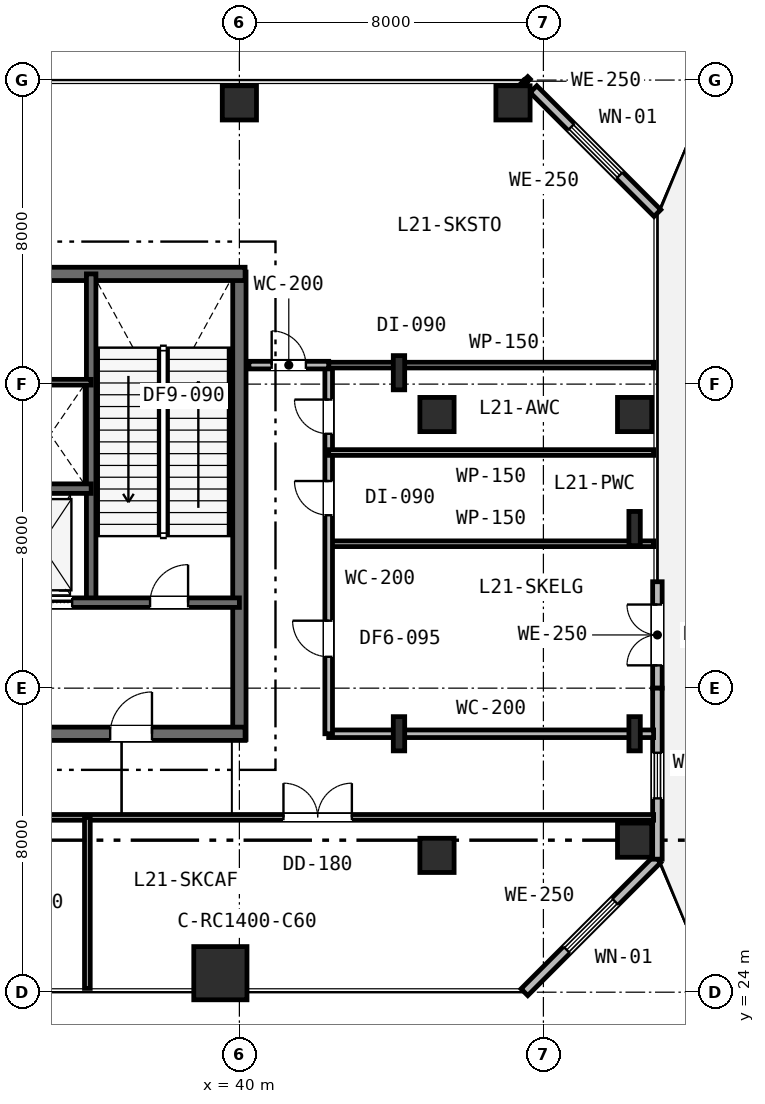
"""IFC4 building model, lengths in metres.
Left out: names, types, materials, properties, quantities, classifications, styles, units other than length and angle.
Written with IfcOpenShell. Run it as: python <this file> out.ifc"""

import sys

from ifc_helpers import new_model, si_unit, direction, frame, frame_2d, origin, origin_2d, place, context, subcontext, project, spatial, rectangle, i_section, extrude, element, fill, save


model = new_model("IFC4")
c1 = context("Model", 3, precision=1e-05, world=origin(), true_north=direction((0.0, 1.0)))
c2 = subcontext(c1, "Body", "Model", "MODEL_VIEW")
j1 = project(units=[si_unit("LENGTHUNIT", "METRE"), si_unit("PLANEANGLEUNIT", "RADIAN")], contexts=[c1])
p1 = place(None, origin())
s1 = spatial("IfcSite", under=j1, at=p1, CompositionType="ELEMENT")
p2 = place(p1, origin())
s2 = spatial("IfcBuilding", under=s1, at=p2, CompositionType="ELEMENT")
p3 = place(p2, frame((0.0, 0.0, 84.6)))
s3 = spatial("IfcBuildingStorey", under=s2, at=p3, CompositionType="ELEMENT", Elevation=84.6)
p4 = place(p3, frame((40.0, 30.65, 0.0), z_axis=(0.0, 0.0, 1.0), x_axis=(0.0, 1.0, 0.0)))
e1 = element("IfcWall", 1, at=p4, inside=s3, PredefinedType="SHEAR", context=c2, shape_type="SweptSolid", body=[
    extrude(rectangle(XDim=12.3, YDim=0.35, at=frame_2d((6.15, 0.0))), origin(), (0.0, 0.0, 1.0), 5.4),
])
p5 = place(p3, frame((15.85, 42.9, 0.0), z_axis=(0.0, 0.0, 1.0), x_axis=(1.0, 0.0, 0.0)))
e2 = element("IfcWall", 2, at=p5, inside=s3, PredefinedType="SHEAR", context=c2, shape_type="SweptSolid", body=[
    extrude(rectangle(XDim=24.3, YDim=0.35, at=frame_2d((12.15, 0.0))), origin(), (0.0, 0.0, 1.0), 5.4),
])
p6 = place(p3, frame((28.95, 30.8, 0.0), z_axis=(0.0, 0.0, 1.0), x_axis=(1.0, 0.0, 0.0)))
e3 = element("IfcWall", 3, at=p6, inside=s3, PredefinedType="SHEAR", context=c2, shape_type="SweptSolid", body=[
    extrude(rectangle(XDim=11.2, YDim=0.35, at=frame_2d((5.6, 0.0))), origin(), (0.0, 0.0, 1.0), 5.4),
])
p7 = place(p6, frame((7.65, 0.0, 0.0)))
e4 = element("IfcOpeningElement", 4, at=p7, cuts=e3, PredefinedType="OPENING", context=c2, shape_type="SweptSolid", body=[
    extrude(rectangle(XDim=1.1, YDim=2.15, at=frame_2d((0.55, 1.075))), frame((0.0, 0.185, 0.0), z_axis=(0.0, -1.0, 0.0), x_axis=(1.0, 0.0, 0.0)), (0.0, 0.0, 1.0), 0.37),
])
p8 = place(p3, frame((36.1, 34.25, 0.0), z_axis=(0.0, 0.0, 1.0), x_axis=(0.0, 1.0, 0.0)))
e5 = element("IfcWall", 5, at=p8, inside=s3, PredefinedType="SHEAR", context=c2, shape_type="SweptSolid", body=[
    extrude(rectangle(XDim=8.65, YDim=0.25, at=frame_2d((4.325, 0.0))), origin(), (0.0, 0.0, 1.0), 5.4),
])
p9 = place(p3, frame((33.95, 34.25, 0.0), z_axis=(0.0, 0.0, 1.0), x_axis=(1.0, 0.0, 0.0)))
e6 = element("IfcWall", 6, at=p9, inside=s3, PredefinedType="SHEAR", context=c2, shape_type="SweptSolid", body=[
    extrude(rectangle(XDim=6.05, YDim=0.25, at=frame_2d((3.025, 0.0))), origin(), (0.0, 0.0, 1.0), 5.4),
])
p10 = place(p9, frame((3.7, 0.0, 0.0)))
e7 = element("IfcOpeningElement", 7, at=p10, cuts=e6, PredefinedType="OPENING", context=c2, shape_type="SweptSolid", body=[
    extrude(rectangle(XDim=1.0, YDim=2.15, at=frame_2d((0.5, 1.075))), frame((0.0, 0.135, 0.0), z_axis=(0.0, -1.0, 0.0), x_axis=(1.0, 0.0, 0.0)), (0.0, 0.0, 1.0), 0.27),
])
p11 = place(p9, frame((0.55, 0.0, 0.0)))
e8 = element("IfcOpeningElement", 8, at=p11, cuts=e6, PredefinedType="OPENING", context=c2, shape_type="SweptSolid", body=[
    extrude(rectangle(XDim=1.1, YDim=2.15, at=frame_2d((0.55, 1.075))), frame((0.0, 0.135, 0.0), z_axis=(0.0, -1.0, 0.0), x_axis=(1.0, 0.0, 0.0)), (0.0, 0.0, 1.0), 0.27),
])
p12 = place(p3, frame((19.9, 37.25, 0.0), z_axis=(0.0, 0.0, 1.0), x_axis=(1.0, 0.0, 0.0)))
e9 = element("IfcWall", 9, at=p12, inside=s3, PredefinedType="SHEAR", context=c2, shape_type="SweptSolid", body=[
    extrude(rectangle(XDim=16.2, YDim=0.25, at=frame_2d((8.1, 0.0))), origin(), (0.0, 0.0, 1.0), 5.4),
])
p13 = place(p12, frame((12.55, 0.0, 0.0)))
e10 = element("IfcOpeningElement", 10, at=p13, cuts=e9, PredefinedType="OPENING", context=c2, shape_type="SweptSolid", body=[
    extrude(rectangle(XDim=0.9, YDim=2.15, at=frame_2d((0.45, 1.075))), frame((0.0, 0.135, 0.0), z_axis=(0.0, -1.0, 0.0), x_axis=(1.0, 0.0, 0.0)), (0.0, 0.0, 1.0), 0.27),
])
p14 = place(p3, frame((39.5, 24.5, 0.0), z_axis=(0.0, 0.0, 1.0), x_axis=(1.0, 0.0, 0.0)))
e11 = element("IfcColumn", 11, at=p14, inside=s3, PredefinedType="COLUMN", context=c2, shape_type="SweptSolid", body=[
    extrude(rectangle(XDim=1.4, YDim=1.4, at=origin_2d()), origin(), (0.0, 0.0, 1.0), 5.4),
])
for number, where, z_axis, x_axis in (
    (12, (45.2, 27.6, 0.0), (0.0, 0.0, 1.0), (1.0, 0.0, 0.0)),
    (13, (45.2, 39.2, 0.0), (0.0, 0.0, 1.0), (1.0, 0.0, 0.0)),
    (14, (40.0, 47.4, 0.0), (0.0, 0.0, 1.0), (1.0, 0.0, 0.0)),
    (15, (47.2, 47.4, 0.0), (0.0, 0.0, 1.0), (1.0, 0.0, 0.0)),
    (16, (50.4, 28.0, 0.0), (0.0, 0.0, 1.0), (1.0, 0.0, 0.0)),
    (17, (50.4, 39.2, 0.0), (0.0, 0.0, 1.0), (1.0, 0.0, 0.0)),
):
    element("IfcColumn", number, at=place(p3, frame(where, z_axis=z_axis, x_axis=x_axis)), inside=s3, PredefinedType="COLUMN", context=c2, shape_type="SweptSolid", body=[
        extrude(rectangle(XDim=0.9, YDim=0.9, at=origin_2d()), origin(), (0.0, 0.0, 1.0), 5.4),
    ])
for number, where, z_axis, x_axis in (
    (18, (44.2, 30.8, 0.0), (0.0, 0.0, 1.0), (1.0, 0.0, 0.0)),
    (19, (44.2, 40.3, 0.0), (0.0, 0.0, 1.0), (1.0, 0.0, 0.0)),
    (20, (50.4, 30.8, 0.0), (0.0, 0.0, 1.0), (1.0, 0.0, 0.0)),
    (21, (50.4, 36.2, 0.0), (0.0, 0.0, 1.0), (1.0, 0.0, 0.0)),
):
    element("IfcColumn", number, at=place(p3, frame(where, z_axis=z_axis, x_axis=x_axis)), inside=s3, PredefinedType="COLUMN", context=c2, shape_type="SweptSolid", body=[
        extrude(i_section(OverallWidth=0.3, OverallDepth=0.9, WebThickness=0.018, FlangeThickness=0.035, FilletRadius=0.03, at=origin_2d()), origin(), (0.0, 0.0, 1.0), 5.4),
    ])
p15 = place(p3, frame((47.5, 24.0, 0.0), z_axis=(0.0, 0.0, 1.0), x_axis=(0.707106781187, 0.707106781187, 0.0)))
e22 = element("IfcWall", 22, at=p15, inside=s3, PredefinedType="STANDARD", context=c2, shape_type="SweptSolid", body=[
    extrude(rectangle(XDim=4.95, YDim=0.25, at=frame_2d((2.475, 0.0))), origin(), (0.0, 0.0, 1.0), 5.13),
])
p16 = place(p15, frame((1.575, 0.0, 0.75)))
e23 = element("IfcOpeningElement", 23, at=p16, cuts=e22, PredefinedType="OPENING", context=c2, shape_type="SweptSolid", body=[
    extrude(rectangle(XDim=1.8, YDim=1.85, at=frame_2d((0.9, 0.925))), frame((0.0, 0.135, 0.0), z_axis=(0.0, -1.0, 0.0), x_axis=(1.0, 0.0, 0.0)), (0.0, 0.0, 1.0), 0.27),
])
p17 = place(p3, frame((51.0, 32.0, 0.0), z_axis=(0.0, 0.0, 1.0), x_axis=(0.0, 1.0, 0.0)))
e24 = element("IfcWall", 24, at=p17, inside=s3, PredefinedType="STANDARD", context=c2, shape_type="SweptSolid", body=[
    extrude(rectangle(XDim=2.8, YDim=0.25, at=frame_2d((1.4, 0.0))), origin(), (0.0, 0.0, 1.0), 5.13),
])
p18 = place(p17, frame((0.6, 0.0, 0.0)))
e25 = element("IfcOpeningElement", 25, at=p18, cuts=e24, PredefinedType="OPENING", context=c2, shape_type="SweptSolid", body=[
    extrude(rectangle(XDim=1.6, YDim=2.2, at=frame_2d((0.8, 1.1))), frame((0.0, 0.135, 0.0), z_axis=(0.0, -1.0, 0.0), x_axis=(1.0, 0.0, 0.0)), (0.0, 0.0, 1.0), 0.27),
])
p19 = place(p3, frame((51.0, 27.5, 0.0), z_axis=(0.0, 0.0, 1.0), x_axis=(0.0, 1.0, 0.0)))
e26 = element("IfcWall", 26, at=p19, inside=s3, PredefinedType="STANDARD", context=c2, shape_type="SweptSolid", body=[
    extrude(rectangle(XDim=4.5, YDim=0.25, at=frame_2d((2.25, 0.0))), origin(), (0.0, 0.0, 1.0), 5.13),
])
p20 = place(p19, frame((1.6, 0.0, 0.85)))
e27 = element("IfcOpeningElement", 27, at=p20, cuts=e26, PredefinedType="OPENING", context=c2, shape_type="SweptSolid", body=[
    extrude(rectangle(XDim=1.2, YDim=1.6, at=frame_2d((0.6, 0.8))), frame((0.0, 0.135, 0.0), z_axis=(0.0, -1.0, 0.0), x_axis=(1.0, 0.0, 0.0)), (0.0, 0.0, 1.0), 0.27),
])
p21 = place(p3, frame((51.0, 44.5, 0.0), z_axis=(0.0, 0.0, 1.0), x_axis=(-0.707106781187, 0.707106781187, 0.0)))
e28 = element("IfcWall", 28, at=p21, inside=s3, PredefinedType="STANDARD", context=c2, shape_type="SweptSolid", body=[
    extrude(rectangle(XDim=4.613, YDim=0.25, at=frame_2d((2.306, 0.0))), origin(), (0.0, 0.0, 1.0), 5.13),
])
p22 = place(p21, frame((1.406, 0.0, 0.75)))
e29 = element("IfcOpeningElement", 29, at=p22, cuts=e28, PredefinedType="OPENING", context=c2, shape_type="SweptSolid", body=[
    extrude(rectangle(XDim=1.8, YDim=1.85, at=frame_2d((0.9, 0.925))), frame((0.0, 0.135, 0.0), z_axis=(0.0, -1.0, 0.0), x_axis=(1.0, 0.0, 0.0)), (0.0, 0.0, 1.0), 0.27),
])
p23 = place(p3, frame((47.562, 47.938, 0.0), z_axis=(0.0, 0.0, 1.0), x_axis=(-0.707106781187, 0.707106781187, 0.0)))
e30 = element("IfcWall", 30, at=p23, inside=s3, PredefinedType="STANDARD", context=c2, shape_type="SweptSolid", body=[
    extrude(rectangle(XDim=0.087, YDim=0.25, at=frame_2d((0.044, 0.0))), origin(), (0.0, 0.0, 1.0), 5.13),
])
p24 = place(p3, frame((34.05, 40.05, 0.0), z_axis=(0.0, 0.0, 1.0), x_axis=(1.0, 0.0, 0.0)))
e31 = element("IfcWall", 31, at=p24, inside=s3, PredefinedType="PARTITIONING", context=c2, shape_type="SweptSolid", body=[
    extrude(rectangle(XDim=2.05, YDim=0.15, at=frame_2d((1.025, 0.0))), origin(), (0.0, 0.0, 1.0), 5.13),
])
p25 = place(p3, frame((42.35, 30.8, 0.0), z_axis=(0.0, 0.0, 1.0), x_axis=(1.0, 0.0, 0.0)))
e32 = element("IfcWall", 32, at=p25, inside=s3, PredefinedType="PARTITIONING", context=c2, shape_type="SweptSolid", body=[
    extrude(rectangle(XDim=8.55, YDim=0.2, at=frame_2d((4.275, 0.0))), origin(), (0.0, 0.0, 1.0), 4.63),
])
p26 = place(p3, frame((42.35, 35.8, 0.0), z_axis=(0.0, 0.0, 1.0), x_axis=(1.0, 0.0, 0.0)))
e33 = element("IfcWall", 33, at=p26, inside=s3, PredefinedType="PARTITIONING", context=c2, shape_type="SweptSolid", body=[
    extrude(rectangle(XDim=8.55, YDim=0.15, at=frame_2d((4.275, 0.0))), origin(), (0.0, 0.0, 1.0), 4.63),
])
p27 = place(p3, frame((42.35, 30.8, 0.0), z_axis=(0.0, 0.0, 1.0), x_axis=(0.0, 1.0, 0.0)))
e34 = element("IfcWall", 34, at=p27, inside=s3, PredefinedType="PARTITIONING", context=c2, shape_type="SweptSolid", body=[
    extrude(rectangle(XDim=9.7, YDim=0.2, at=frame_2d((4.85, 0.0))), origin(), (0.0, 0.0, 1.0), 4.63),
])
p28 = place(p27, frame((2.025, 0.0, 0.0)))
e35 = element("IfcOpeningElement", 35, at=p28, cuts=e34, PredefinedType="OPENING", context=c2, shape_type="SweptSolid", body=[
    extrude(rectangle(XDim=0.95, YDim=2.15, at=frame_2d((0.475, 1.075))), frame((0.0, 0.11, 0.0), z_axis=(0.0, -1.0, 0.0), x_axis=(1.0, 0.0, 0.0)), (0.0, 0.0, 1.0), 0.22),
])
p29 = place(p27, frame((5.75, 0.0, 0.0)))
e36 = element("IfcOpeningElement", 36, at=p29, cuts=e34, PredefinedType="OPENING", context=c2, shape_type="SweptSolid", body=[
    extrude(rectangle(XDim=0.9, YDim=2.15, at=frame_2d((0.45, 1.075))), frame((0.0, 0.11, 0.0), z_axis=(0.0, -1.0, 0.0), x_axis=(1.0, 0.0, 0.0)), (0.0, 0.0, 1.0), 0.22),
])
p30 = place(p27, frame((7.893, 0.0, 0.0)))
e37 = element("IfcOpeningElement", 37, at=p30, cuts=e34, PredefinedType="OPENING", context=c2, shape_type="SweptSolid", body=[
    extrude(rectangle(XDim=0.9, YDim=2.15, at=frame_2d((0.45, 1.075))), frame((0.0, 0.11, 0.0), z_axis=(0.0, -1.0, 0.0), x_axis=(1.0, 0.0, 0.0)), (0.0, 0.0, 1.0), 0.22),
])
for number, where, z_axis, x_axis in (
    (38, (42.35, 38.2, 0.0), (0.0, 0.0, 1.0), (1.0, 0.0, 0.0)),
    (39, (42.35, 40.5, 0.0), (0.0, 0.0, 1.0), (1.0, 0.0, 0.0)),
):
    element("IfcWall", number, at=place(p3, frame(where, z_axis=z_axis, x_axis=x_axis)), inside=s3, PredefinedType="PARTITIONING", context=c2, shape_type="SweptSolid", body=[
        extrude(rectangle(XDim=8.55, YDim=0.15, at=frame_2d((4.275, 0.0))), origin(), (0.0, 0.0, 1.0), 4.63),
    ])
p31 = place(p3, frame((40.25, 40.5, 0.0), z_axis=(0.0, 0.0, 1.0), x_axis=(1.0, 0.0, 0.0)))
e40 = element("IfcWall", 40, at=p31, inside=s3, PredefinedType="PARTITIONING", context=c2, shape_type="SweptSolid", body=[
    extrude(rectangle(XDim=2.1, YDim=0.2, at=frame_2d((1.05, 0.0))), origin(), (0.0, 0.0, 1.0), 5.13),
])
p32 = place(p31, frame((0.6, 0.0, 0.0)))
e41 = element("IfcOpeningElement", 41, at=p32, cuts=e40, PredefinedType="OPENING", context=c2, shape_type="SweptSolid", body=[
    extrude(rectangle(XDim=0.9, YDim=2.15, at=frame_2d((0.45, 1.075))), frame((0.0, 0.11, 0.0), z_axis=(0.0, -1.0, 0.0), x_axis=(1.0, 0.0, 0.0)), (0.0, 0.0, 1.0), 0.22),
])
p33 = place(p3, frame((13.7, 28.6, 0.0), z_axis=(0.0, 0.0, 1.0), x_axis=(1.0, 0.0, 0.0)))
e42 = element("IfcWall", 42, at=p33, inside=s3, PredefinedType="PARTITIONING", context=c2, shape_type="SweptSolid", body=[
    extrude(rectangle(XDim=37.2, YDim=0.15, at=frame_2d((18.6, 0.0))), origin(), (0.0, 0.0, 1.0), 4.63),
])
p34 = place(p33, frame((15.4, 0.0, 0.0)))
e43 = element("IfcOpeningElement", 43, at=p34, cuts=e42, PredefinedType="OPENING", context=c2, shape_type="SweptSolid", body=[
    extrude(rectangle(XDim=1.8, YDim=2.15, at=frame_2d((0.9, 1.075))), frame((0.0, 0.085, 0.0), z_axis=(0.0, -1.0, 0.0), x_axis=(1.0, 0.0, 0.0)), (0.0, 0.0, 1.0), 0.17),
])
p35 = place(p33, frame((27.46, 0.0, 0.0)))
e44 = element("IfcOpeningElement", 44, at=p35, cuts=e42, PredefinedType="OPENING", context=c2, shape_type="SweptSolid", body=[
    extrude(rectangle(XDim=1.8, YDim=2.15, at=frame_2d((0.9, 1.075))), frame((0.0, 0.085, 0.0), z_axis=(0.0, -1.0, 0.0), x_axis=(1.0, 0.0, 0.0)), (0.0, 0.0, 1.0), 0.17),
])
p36 = place(p3, frame((36.0, 24.1, 0.0), z_axis=(0.0, 0.0, 1.0), x_axis=(0.0, 1.0, 0.0)))
e45 = element("IfcWall", 45, at=p36, inside=s3, PredefinedType="PARTITIONING", context=c2, shape_type="SweptSolid", body=[
    extrude(rectangle(XDim=4.5, YDim=0.15, at=frame_2d((2.25, 0.0))), origin(), (0.0, 0.0, 1.0), 4.72),
])
p37 = place(p16, origin())
e46 = element("IfcWindow", 46, at=p37, inside=s3, PartitioningType="SINGLE_PANEL", PredefinedType="WINDOW", context=c2, shape_type="SweptSolid", body=[
    extrude(rectangle(XDim=1.8, YDim=1.85, at=frame_2d((0.9, 0.925))), frame((0.0, 0.03, 0.0), z_axis=(0.0, -1.0, 0.0), x_axis=(1.0, 0.0, 0.0)), (0.0, 0.0, 1.0), 0.06),
])
fill(e23, e46)
p38 = place(p18, origin())
e47 = element("IfcDoor", 47, at=p38, inside=s3, OperationType="DOUBLE_DOOR_SINGLE_SWING", PredefinedType="DOOR", context=c2, shape_type="SweptSolid", body=[
    extrude(rectangle(XDim=1.6, YDim=2.2, at=frame_2d((0.8, 1.1))), frame((0.0, 0.025, 0.0), z_axis=(0.0, -1.0, 0.0), x_axis=(1.0, 0.0, 0.0)), (0.0, 0.0, 1.0), 0.05),
])
fill(e25, e47)
p39 = place(p20, origin())
e48 = element("IfcWindow", 48, at=p39, inside=s3, PartitioningType="SINGLE_PANEL", PredefinedType="WINDOW", context=c2, shape_type="SweptSolid", body=[
    extrude(rectangle(XDim=1.2, YDim=1.6, at=frame_2d((0.6, 0.8))), frame((0.0, 0.03, 0.0), z_axis=(0.0, -1.0, 0.0), x_axis=(1.0, 0.0, 0.0)), (0.0, 0.0, 1.0), 0.06),
])
fill(e27, e48)
p40 = place(p22, origin())
e49 = element("IfcWindow", 49, at=p40, inside=s3, PartitioningType="SINGLE_PANEL", PredefinedType="WINDOW", context=c2, shape_type="SweptSolid", body=[
    extrude(rectangle(XDim=1.8, YDim=1.85, at=frame_2d((0.9, 0.925))), frame((0.0, 0.03, 0.0), z_axis=(0.0, -1.0, 0.0), x_axis=(1.0, 0.0, 0.0)), (0.0, 0.0, 1.0), 0.06),
])
fill(e29, e49)
p41 = place(p10, origin())
e50 = element("IfcDoor", 50, at=p41, inside=s3, OperationType="SINGLE_SWING_RIGHT", PredefinedType="DOOR", context=c2, shape_type="SweptSolid", body=[
    extrude(rectangle(XDim=1.0, YDim=2.15, at=frame_2d((0.5, 1.075))), frame((0.0, 0.025, 0.0), z_axis=(0.0, -1.0, 0.0), x_axis=(1.0, 0.0, 0.0)), (0.0, 0.0, 1.0), 0.05),
])
fill(e7, e50)
p42 = place(p7, origin())
e51 = element("IfcDoor", 51, at=p42, inside=s3, OperationType="SINGLE_SWING_RIGHT", PredefinedType="DOOR", context=c2, shape_type="SweptSolid", body=[
    extrude(rectangle(XDim=1.1, YDim=2.15, at=frame_2d((0.55, 1.075))), frame((0.0, 0.025, 0.0), z_axis=(0.0, -1.0, 0.0), x_axis=(1.0, 0.0, 0.0)), (0.0, 0.0, 1.0), 0.05),
])
fill(e4, e51)
p43 = place(p28, origin())
e52 = element("IfcDoor", 52, at=p43, inside=s3, OperationType="SINGLE_SWING_RIGHT", PredefinedType="DOOR", context=c2, shape_type="SweptSolid", body=[
    extrude(rectangle(XDim=0.95, YDim=2.15, at=frame_2d((0.475, 1.075))), frame((0.0, 0.025, 0.0), z_axis=(0.0, -1.0, 0.0), x_axis=(1.0, 0.0, 0.0)), (0.0, 0.0, 1.0), 0.05),
])
fill(e35, e52)
p44 = place(p29, origin())
e53 = element("IfcDoor", 53, at=p44, inside=s3, OperationType="SINGLE_SWING_RIGHT", PredefinedType="DOOR", context=c2, shape_type="SweptSolid", body=[
    extrude(rectangle(XDim=0.9, YDim=2.15, at=frame_2d((0.45, 1.075))), frame((0.0, 0.025, 0.0), z_axis=(0.0, -1.0, 0.0), x_axis=(1.0, 0.0, 0.0)), (0.0, 0.0, 1.0), 0.05),
])
fill(e36, e53)
p45 = place(p30, origin())
e54 = element("IfcDoor", 54, at=p45, inside=s3, OperationType="SINGLE_SWING_RIGHT", PredefinedType="DOOR", context=c2, shape_type="SweptSolid", body=[
    extrude(rectangle(XDim=0.9, YDim=2.15, at=frame_2d((0.45, 1.075))), frame((0.0, 0.025, 0.0), z_axis=(0.0, -1.0, 0.0), x_axis=(1.0, 0.0, 0.0)), (0.0, 0.0, 1.0), 0.05),
])
fill(e37, e54)
p46 = place(p32, origin())
e55 = element("IfcDoor", 55, at=p46, inside=s3, OperationType="SINGLE_SWING_LEFT", PredefinedType="DOOR", context=c2, shape_type="SweptSolid", body=[
    extrude(rectangle(XDim=0.9, YDim=2.15, at=frame_2d((0.45, 1.075))), frame((0.0, 0.025, 0.0), z_axis=(0.0, -1.0, 0.0), x_axis=(1.0, 0.0, 0.0)), (0.0, 0.0, 1.0), 0.05),
])
fill(e41, e55)
p47 = place(p35, origin())
e56 = element("IfcDoor", 56, at=p47, inside=s3, OperationType="DOUBLE_DOOR_SINGLE_SWING", PredefinedType="DOOR", context=c2, shape_type="SweptSolid", body=[
    extrude(rectangle(XDim=1.8, YDim=2.15, at=frame_2d((0.9, 1.075))), frame((0.0, 0.025, 0.0), z_axis=(0.0, -1.0, 0.0), x_axis=(1.0, 0.0, 0.0)), (0.0, 0.0, 1.0), 0.05),
])
fill(e44, e56)
p48 = place(p11, origin())
e57 = element("IfcDoor", 57, at=p48, inside=s3, OperationType="DOUBLE_DOOR_SLIDING", PredefinedType="DOOR", context=c2, shape_type="SweptSolid", body=[
    extrude(rectangle(XDim=1.1, YDim=2.15, at=frame_2d((0.55, 1.075))), frame((0.0, 0.025, 0.0), z_axis=(0.0, -1.0, 0.0), x_axis=(1.0, 0.0, 0.0)), (0.0, 0.0, 1.0), 0.05),
])
fill(e8, e57)
save(model, sys.argv[1])
